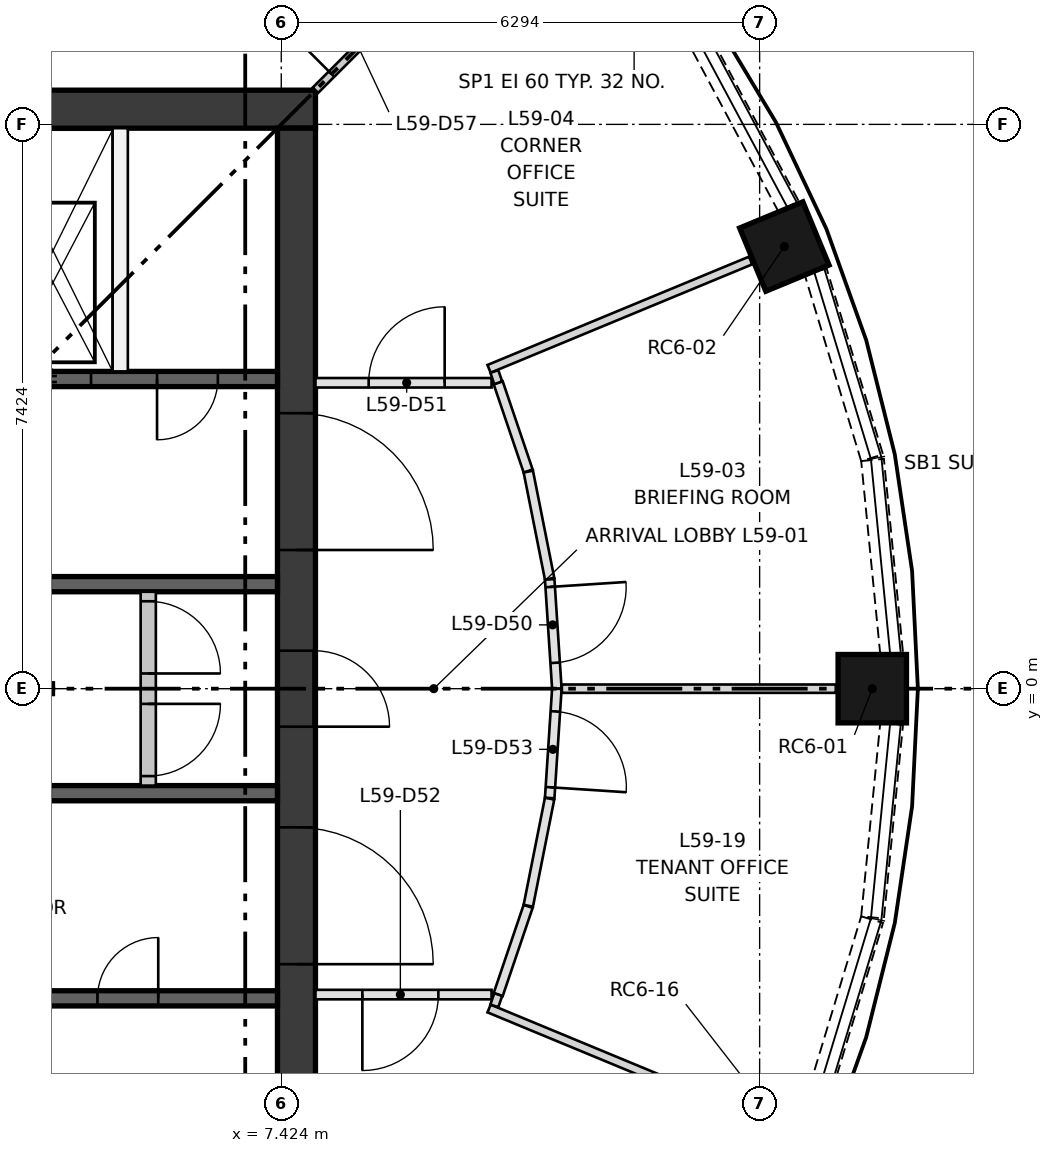
"""IFC4 building model, lengths in metres.
Left out: names, types, materials, properties, quantities, classifications, styles, units other than length and angle.
Written with IfcOpenShell. Run it as: python <this file> out.ifc"""

import sys

from ifc_helpers import new_model, si_unit, direction, frame, frame_2d, origin, origin_2d, place, context, subcontext, project, spatial, rectangle, extrude, element, fill, save


model = new_model("IFC4")
c1 = context("Model", 3, precision=1e-05, world=origin(), true_north=direction((0.0, 1.0)))
c2 = subcontext(c1, "Body", "Model", "MODEL_VIEW")
j1 = project(units=[si_unit("LENGTHUNIT", "METRE"), si_unit("PLANEANGLEUNIT", "RADIAN")], contexts=[c1])
p1 = place(None, origin())
s1 = spatial("IfcSite", under=j1, at=p1, CompositionType="ELEMENT")
p2 = place(p1, origin())
s2 = spatial("IfcBuilding", under=s1, at=p2, CompositionType="ELEMENT")
p3 = place(p2, frame((0.0, 0.0, 217.8)))
s3 = spatial("IfcBuildingStorey", under=s2, at=p3, CompositionType="ELEMENT", Elevation=217.8)
for number, where, z_axis, x_axis in (
    (1, (15.2, 0.0, 0.5), (0.0, 0.0, 1.0), (1.0, 0.0, 0.0)),
    (2, (14.043, 5.817, 0.5), (0.0, 0.0, 1.0), (0.924, 0.383, 0.0)),
):
    element("IfcColumn", number, at=place(p3, frame(where, z_axis=z_axis, x_axis=x_axis)), inside=s3, PredefinedType="COLUMN", context=c2, shape_type="SweptSolid", body=[
        extrude(rectangle(XDim=0.9, YDim=0.9, at=origin_2d()), origin(), (0.0, 0.0, 1.0), 2.85),
    ])
p4 = place(p3, frame((-7.874, 7.624, 0.0), z_axis=(0.0, 0.0, 1.0), x_axis=(1.0, 0.0, 0.0)))
e3 = element("IfcWall", 3, at=p4, inside=s3, PredefinedType="SHEAR", context=c2, shape_type="SweptSolid", body=[
    extrude(rectangle(XDim=15.748, YDim=0.5, at=frame_2d((7.874, 0.0))), origin(), (0.0, 0.0, 1.0), 3.35),
])
p5 = place(p3, frame((7.624, -7.374, 0.0), z_axis=(0.0, 0.0, 1.0), x_axis=(0.0, 1.0, 0.0)))
e4 = element("IfcWall", 4, at=p5, inside=s3, PredefinedType="SHEAR", context=c2, shape_type="SweptSolid", body=[
    extrude(rectangle(XDim=14.748, YDim=0.5, at=frame_2d((7.374, 0.0))), origin(), (0.0, 0.0, 1.0), 3.35),
])
p6 = place(p5, frame((6.874, 0.0, 0.0)))
e5 = element("IfcOpeningElement", 5, at=p6, cuts=e4, PredefinedType="OPENING", context=c2, shape_type="SweptSolid", body=[
    extrude(rectangle(XDim=1.0, YDim=2.1, at=frame_2d((0.5, 1.05))), frame((0.0, 0.26, 0.0), z_axis=(0.0, -1.0, 0.0), x_axis=(1.0, 0.0, 0.0)), (0.0, 0.0, 1.0), 0.52),
])
p7 = place(p5, frame((3.75, 0.0, 0.0)))
e6 = element("IfcOpeningElement", 6, at=p7, cuts=e4, PredefinedType="OPENING", context=c2, shape_type="SweptSolid", body=[
    extrude(rectangle(XDim=1.8, YDim=2.1, at=frame_2d((0.9, 1.05))), frame((0.0, 0.26, 0.0), z_axis=(0.0, -1.0, 0.0), x_axis=(1.0, 0.0, 0.0)), (0.0, 0.0, 1.0), 0.52),
])
p8 = place(p5, frame((9.198, 0.0, 0.0)))
e7 = element("IfcOpeningElement", 7, at=p8, cuts=e4, PredefinedType="OPENING", context=c2, shape_type="SweptSolid", body=[
    extrude(rectangle(XDim=1.8, YDim=2.1, at=frame_2d((0.9, 1.05))), frame((0.0, 0.26, 0.0), z_axis=(0.0, -1.0, 0.0), x_axis=(1.0, 0.0, 0.0)), (0.0, 0.0, 1.0), 0.52),
])
p9 = place(p3, frame((-7.374, -4.074, 0.0), z_axis=(0.0, 0.0, 1.0), x_axis=(1.0, 0.0, 0.0)))
e8 = element("IfcWall", 8, at=p9, inside=s3, PredefinedType="SHEAR", context=c2, shape_type="SweptSolid", body=[
    extrude(rectangle(XDim=14.748, YDim=0.2, at=frame_2d((7.374, 0.0))), origin(), (0.0, 0.0, 1.0), 3.0),
])
p10 = place(p9, frame((1.319, 0.0, 0.0)))
e9 = element("IfcOpeningElement", 9, at=p10, cuts=e8, PredefinedType="OPENING", context=c2, shape_type="SweptSolid", body=[
    extrude(rectangle(XDim=1.1, YDim=2.1, at=frame_2d((0.55, 1.05))), frame((0.0, 0.11, 0.0), z_axis=(0.0, -1.0, 0.0), x_axis=(1.0, 0.0, 0.0)), (0.0, 0.0, 1.0), 0.22),
])
p11 = place(p9, frame((4.456, 0.0, 0.0)))
e10 = element("IfcOpeningElement", 10, at=p11, cuts=e8, PredefinedType="OPENING", context=c2, shape_type="SweptSolid", body=[
    extrude(rectangle(XDim=1.1, YDim=2.1, at=frame_2d((0.55, 1.05))), frame((0.0, 0.11, 0.0), z_axis=(0.0, -1.0, 0.0), x_axis=(1.0, 0.0, 0.0)), (0.0, 0.0, 1.0), 0.22),
])
p12 = place(p9, frame((8.143, 0.0, 0.0)))
e11 = element("IfcOpeningElement", 11, at=p12, cuts=e8, PredefinedType="OPENING", context=c2, shape_type="SweptSolid", body=[
    extrude(rectangle(XDim=1.0, YDim=2.1, at=frame_2d((0.5, 1.05))), frame((0.0, 0.11, 0.0), z_axis=(0.0, -1.0, 0.0), x_axis=(1.0, 0.0, 0.0)), (0.0, 0.0, 1.0), 0.22),
])
p13 = place(p9, frame((12.379, 0.0, 0.0)))
e12 = element("IfcOpeningElement", 12, at=p13, cuts=e8, PredefinedType="OPENING", context=c2, shape_type="SweptSolid", body=[
    extrude(rectangle(XDim=0.8, YDim=2.1, at=frame_2d((0.4, 1.05))), frame((0.0, 0.11, 0.0), z_axis=(0.0, -1.0, 0.0), x_axis=(1.0, 0.0, 0.0)), (0.0, 0.0, 1.0), 0.22),
])
p14 = place(p3, frame((0.0, 4.074, 0.0), z_axis=(0.0, 0.0, 1.0), x_axis=(1.0, 0.0, 0.0)))
e13 = element("IfcWall", 13, at=p14, inside=s3, PredefinedType="SHEAR", context=c2, shape_type="SweptSolid", body=[
    extrude(rectangle(XDim=7.374, YDim=0.2, at=frame_2d((3.687, 0.0))), origin(), (0.0, 0.0, 1.0), 3.0),
])
p15 = place(p14, frame((0.384, 0.0, 0.0)))
e14 = element("IfcOpeningElement", 14, at=p15, cuts=e13, PredefinedType="OPENING", context=c2, shape_type="SweptSolid", body=[
    extrude(rectangle(XDim=1.0, YDim=2.1, at=frame_2d((0.5, 1.05))), frame((0.0, 0.11, 0.0), z_axis=(0.0, -1.0, 0.0), x_axis=(1.0, 0.0, 0.0)), (0.0, 0.0, 1.0), 0.22),
])
p16 = place(p14, frame((2.153, 0.0, 0.0)))
e15 = element("IfcOpeningElement", 15, at=p16, cuts=e13, PredefinedType="OPENING", context=c2, shape_type="SweptSolid", body=[
    extrude(rectangle(XDim=1.0, YDim=2.1, at=frame_2d((0.5, 1.05))), frame((0.0, 0.11, 0.0), z_axis=(0.0, -1.0, 0.0), x_axis=(1.0, 0.0, 0.0)), (0.0, 0.0, 1.0), 0.22),
])
p17 = place(p14, frame((3.921, 0.0, 0.0)))
e16 = element("IfcOpeningElement", 16, at=p17, cuts=e13, PredefinedType="OPENING", context=c2, shape_type="SweptSolid", body=[
    extrude(rectangle(XDim=1.0, YDim=2.1, at=frame_2d((0.5, 1.05))), frame((0.0, 0.11, 0.0), z_axis=(0.0, -1.0, 0.0), x_axis=(1.0, 0.0, 0.0)), (0.0, 0.0, 1.0), 0.22),
])
p18 = place(p14, frame((5.79, 0.0, 0.0)))
e17 = element("IfcOpeningElement", 17, at=p18, cuts=e13, PredefinedType="OPENING", context=c2, shape_type="SweptSolid", body=[
    extrude(rectangle(XDim=0.8, YDim=2.1, at=frame_2d((0.4, 1.05))), frame((0.0, 0.11, 0.0), z_axis=(0.0, -1.0, 0.0), x_axis=(1.0, 0.0, 0.0)), (0.0, 0.0, 1.0), 0.22),
])
for number, where, z_axis, x_axis in (
    (18, (4.374, -1.375, 0.0), (0.0, 0.0, 1.0), (1.0, 0.0, 0.0)),
    (19, (4.374, 1.375, 0.0), (0.0, 0.0, 1.0), (1.0, 0.0, 0.0)),
):
    element("IfcWall", number, at=place(p3, frame(where, z_axis=z_axis, x_axis=x_axis)), inside=s3, PredefinedType="SHEAR", context=c2, shape_type="SweptSolid", body=[
        extrude(rectangle(XDim=3.0, YDim=0.2, at=frame_2d((1.5, 0.0))), origin(), (0.0, 0.0, 1.0), 3.0),
    ])
p19 = place(p3, frame((5.305, 4.174, 0.0), z_axis=(0.0, 0.0, 1.0), x_axis=(0.0, 1.0, 0.0)))
e20 = element("IfcWall", 20, at=p19, inside=s3, PredefinedType="PARTITIONING", context=c2, shape_type="SweptSolid", body=[
    extrude(rectangle(XDim=3.2, YDim=0.2, at=frame_2d((1.6, 0.0))), origin(), (0.0, 0.0, 1.0), 3.0),
])
p20 = place(p3, frame((5.674, -1.275, 0.0), z_axis=(0.0, 0.0, 1.0), x_axis=(0.0, 1.0, 0.0)))
e21 = element("IfcWall", 21, at=p20, inside=s3, PredefinedType="PARTITIONING", context=c2, shape_type="SweptSolid", body=[
    extrude(rectangle(XDim=2.55, YDim=0.2, at=frame_2d((1.275, 0.0))), origin(), (0.0, 0.0, 1.0), 3.0),
])
p21 = place(p20, frame((0.125, 0.0, 0.0)))
e22 = element("IfcOpeningElement", 22, at=p21, cuts=e21, PredefinedType="OPENING", context=c2, shape_type="SweptSolid", body=[
    extrude(rectangle(XDim=0.95, YDim=2.1, at=frame_2d((0.475, 1.05))), frame((0.0, 0.11, 0.0), z_axis=(0.0, -1.0, 0.0), x_axis=(1.0, 0.0, 0.0)), (0.0, 0.0, 1.0), 0.22),
])
p22 = place(p20, frame((1.475, 0.0, 0.0)))
e23 = element("IfcOpeningElement", 23, at=p22, cuts=e21, PredefinedType="OPENING", context=c2, shape_type="SweptSolid", body=[
    extrude(rectangle(XDim=0.95, YDim=2.1, at=frame_2d((0.475, 1.05))), frame((0.0, 0.11, 0.0), z_axis=(0.0, -1.0, 0.0), x_axis=(1.0, 0.0, 0.0)), (0.0, 0.0, 1.0), 0.22),
])
p23 = place(p3, frame((15.455, 0.464, 0.0), z_axis=(0.0, 0.0, 1.0), x_axis=(-0.09813315545, 0.995173293352, 0.0)))
e24 = element("IfcWall", 24, at=p23, inside=s3, PredefinedType="SOLIDWALL", context=c2, shape_type="SweptSolid", body=[
    extrude(rectangle(XDim=2.558, YDim=0.3, at=frame_2d((1.279, 0.0))), origin(), (0.0, 0.0, 1.0), 0.9),
])
p24 = place(p3, frame((15.198, 3.038, 0.0), z_axis=(0.0, 0.0, 1.0), x_axis=(-0.290219358397, 0.956960147557, 0.0)))
e25 = element("IfcWall", 25, at=p24, inside=s3, PredefinedType="SOLIDWALL", context=c2, shape_type="SweptSolid", body=[
    extrude(rectangle(XDim=2.557, YDim=0.3, at=frame_2d((1.279, 0.0))), origin(), (0.0, 0.0, 1.0), 0.9),
])
p25 = place(p3, frame((14.1, 6.343, 0.0), z_axis=(0.0, 0.0, 1.0), x_axis=(-0.471603904468, 0.881810499649, 0.0)))
e26 = element("IfcWall", 26, at=p25, inside=s3, PredefinedType="SOLIDWALL", context=c2, shape_type="SweptSolid", body=[
    extrude(rectangle(XDim=2.557, YDim=0.3, at=frame_2d((1.278, 0.0))), origin(), (0.0, 0.0, 1.0), 0.9),
])
p26 = place(p3, frame((14.455, -5.486, 0.0), z_axis=(0.0, 0.0, 1.0), x_axis=(0.290219358397, 0.956960147557, 0.0)))
e27 = element("IfcWall", 27, at=p26, inside=s3, PredefinedType="SOLIDWALL", context=c2, shape_type="SweptSolid", body=[
    extrude(rectangle(XDim=2.557, YDim=0.3, at=frame_2d((1.279, 0.0))), origin(), (0.0, 0.0, 1.0), 0.9),
])
p27 = place(p3, frame((15.204, -3.009, 0.0), z_axis=(0.0, 0.0, 1.0), x_axis=(0.09813315545, 0.995173293352, 0.0)))
e28 = element("IfcWall", 28, at=p27, inside=s3, PredefinedType="SOLIDWALL", context=c2, shape_type="SweptSolid", body=[
    extrude(rectangle(XDim=2.558, YDim=0.3, at=frame_2d((1.279, 0.0))), origin(), (0.0, 0.0, 1.0), 0.9),
])
p28 = place(p3, frame((10.278, 4.024, 0.0), z_axis=(0.0, 0.0, 1.0), x_axis=(0.321363343769, -0.946955965862, 0.0)))
e29 = element("IfcWall", 29, at=p28, inside=s3, PredefinedType="PARTITIONING", context=c2, shape_type="SweptSolid", body=[
    extrude(rectangle(XDim=1.225, YDim=0.125, at=frame_2d((0.613, 0.0))), origin(), (0.0, 0.0, 1.0), 3.0),
])
p29 = place(p3, frame((10.674, 2.856, 0.0), z_axis=(0.0, 0.0, 1.0), x_axis=(0.195005351681, -0.980802178228, 0.0)))
e30 = element("IfcWall", 30, at=p29, inside=s3, PredefinedType="PARTITIONING", context=c2, shape_type="SweptSolid", body=[
    extrude(rectangle(XDim=1.437, YDim=0.125, at=frame_2d((0.719, 0.0))), origin(), (0.0, 0.0, 1.0), 3.0),
])
p30 = place(p3, frame((10.956, 1.438, 0.0), z_axis=(0.0, 0.0, 1.0), x_axis=(0.065383473363, -0.997860211358, 0.0)))
e31 = element("IfcWall", 31, at=p30, inside=s3, PredefinedType="PARTITIONING", context=c2, shape_type="SweptSolid", body=[
    extrude(rectangle(XDim=1.441, YDim=0.125, at=frame_2d((0.721, 0.0))), origin(), (0.0, 0.0, 1.0), 3.0),
])
p31 = place(p30, frame((0.1, 0.0, 0.0)))
e32 = element("IfcOpeningElement", 32, at=p31, cuts=e31, PredefinedType="OPENING", context=c2, shape_type="SweptSolid", body=[
    extrude(rectangle(XDim=1.0, YDim=2.1, at=frame_2d((0.5, 1.05))), frame((0.0, 0.073, 0.0), z_axis=(0.0, -1.0, 0.0), x_axis=(1.0, 0.0, 0.0)), (0.0, 0.0, 1.0), 0.145),
])
p32 = place(p3, frame((7.874, 4.024, 0.0), z_axis=(0.0, 0.0, 1.0), x_axis=(1.0, 0.0, 0.0)))
e33 = element("IfcWall", 33, at=p32, inside=s3, PredefinedType="PARTITIONING", context=c2, shape_type="SweptSolid", body=[
    extrude(rectangle(XDim=2.317, YDim=0.125, at=frame_2d((1.158, 0.0))), origin(), (0.0, 0.0, 1.0), 3.0),
])
p33 = place(p32, frame((0.7, 0.0, 0.0)))
e34 = element("IfcOpeningElement", 34, at=p33, cuts=e33, PredefinedType="OPENING", context=c2, shape_type="SweptSolid", body=[
    extrude(rectangle(XDim=1.0, YDim=2.1, at=frame_2d((0.5, 1.05))), frame((0.0, 0.073, 0.0), z_axis=(0.0, -1.0, 0.0), x_axis=(1.0, 0.0, 0.0)), (0.0, 0.0, 1.0), 0.145),
])
p34 = place(p3, frame((10.191, -4.024, 0.0), z_axis=(0.0, 0.0, 1.0), x_axis=(-1.0, 0.0, 0.0)))
e35 = element("IfcWall", 35, at=p34, inside=s3, PredefinedType="PARTITIONING", context=c2, shape_type="SweptSolid", body=[
    extrude(rectangle(XDim=2.317, YDim=0.125, at=frame_2d((1.158, 0.0))), origin(), (0.0, 0.0, 1.0), 3.0),
])
p35 = place(p34, frame((0.7, 0.0, 0.0)))
e36 = element("IfcOpeningElement", 36, at=p35, cuts=e35, PredefinedType="OPENING", context=c2, shape_type="SweptSolid", body=[
    extrude(rectangle(XDim=1.0, YDim=2.1, at=frame_2d((0.5, 1.05))), frame((0.0, 0.073, 0.0), z_axis=(0.0, -1.0, 0.0), x_axis=(1.0, 0.0, 0.0)), (0.0, 0.0, 1.0), 0.145),
])
p36 = place(p3, frame((10.672, -2.864, 0.0), z_axis=(0.0, 0.0, 1.0), x_axis=(-0.321363343769, -0.946955965862, 0.0)))
e37 = element("IfcWall", 37, at=p36, inside=s3, PredefinedType="PARTITIONING", context=c2, shape_type="SweptSolid", body=[
    extrude(rectangle(XDim=1.225, YDim=0.125, at=frame_2d((0.613, 0.0))), origin(), (0.0, 0.0, 1.0), 3.0),
])
p37 = place(p3, frame((10.955, -1.446, 0.0), z_axis=(0.0, 0.0, 1.0), x_axis=(-0.195005351681, -0.980802178228, 0.0)))
e38 = element("IfcWall", 38, at=p37, inside=s3, PredefinedType="PARTITIONING", context=c2, shape_type="SweptSolid", body=[
    extrude(rectangle(XDim=1.437, YDim=0.125, at=frame_2d((0.719, 0.0))), origin(), (0.0, 0.0, 1.0), 3.0),
])
p38 = place(p3, frame((11.05, 0.0, 0.0), z_axis=(0.0, 0.0, 1.0), x_axis=(-0.065383473363, -0.997860211358, 0.0)))
e39 = element("IfcWall", 39, at=p38, inside=s3, PredefinedType="PARTITIONING", context=c2, shape_type="SweptSolid", body=[
    extrude(rectangle(XDim=1.441, YDim=0.125, at=frame_2d((0.721, 0.0))), origin(), (0.0, 0.0, 1.0), 3.0),
])
p39 = place(p38, frame((0.3, 0.0, 0.0)))
e40 = element("IfcOpeningElement", 40, at=p39, cuts=e39, PredefinedType="OPENING", context=c2, shape_type="SweptSolid", body=[
    extrude(rectangle(XDim=1.0, YDim=2.1, at=frame_2d((0.5, 1.05))), frame((0.0, 0.073, 0.0), z_axis=(0.0, -1.0, 0.0), x_axis=(1.0, 0.0, 0.0)), (0.0, 0.0, 1.0), 0.145),
])
p40 = place(p3, frame((10.158, 4.208, 0.0), z_axis=(0.0, 0.0, 1.0), x_axis=(0.923897012701, 0.382641228728, 0.0)))
e41 = element("IfcWall", 41, at=p40, inside=s3, PredefinedType="PARTITIONING", context=c2, shape_type="SweptSolid", body=[
    extrude(rectangle(XDim=3.725, YDim=0.11, at=frame_2d((1.862, 0.0))), origin(), (0.0, 0.0, 1.0), 3.0),
])
p41 = place(p3, frame((10.278, 4.024, 0.0), z_axis=(0.0, 0.0, 1.0), x_axis=(-0.321819116975, 0.94680117023, 0.0)))
e42 = element("IfcWall", 42, at=p41, inside=s3, PredefinedType="PARTITIONING", context=c2, shape_type="SweptSolid", body=[
    extrude(rectangle(XDim=0.157, YDim=0.11, at=frame_2d((0.079, 0.0))), origin(), (0.0, 0.0, 1.0), 3.0),
])
p42 = place(p3, frame((14.72, 0.0, 0.0), z_axis=(0.0, 0.0, 1.0), x_axis=(-1.0, 0.0, 0.0)))
e43 = element("IfcWall", 43, at=p42, inside=s3, PredefinedType="PARTITIONING", context=c2, shape_type="SweptSolid", body=[
    extrude(rectangle(XDim=3.604, YDim=0.11, at=frame_2d((1.802, 0.0))), origin(), (0.0, 0.0, 1.0), 3.0),
])
p43 = place(p3, frame((7.874, 7.874, 0.0), z_axis=(0.0, 0.0, 1.0), x_axis=(0.707106781187, 0.707106781187, 0.0)))
e44 = element("IfcWall", 44, at=p43, inside=s3, PredefinedType="PARTITIONING", context=c2, shape_type="SweptSolid", body=[
    extrude(rectangle(XDim=3.584, YDim=0.1, at=frame_2d((1.792, 0.0))), origin(), (0.0, 0.0, 1.0), 3.0),
])
p44 = place(p43, frame((0.3, 0.0, 0.0)))
e45 = element("IfcOpeningElement", 45, at=p44, cuts=e44, PredefinedType="OPENING", context=c2, shape_type="SweptSolid", body=[
    extrude(rectangle(XDim=1.0, YDim=2.1, at=frame_2d((0.5, 1.05))), frame((0.0, 0.06, 0.0), z_axis=(0.0, -1.0, 0.0), x_axis=(1.0, 0.0, 0.0)), (0.0, 0.0, 1.0), 0.12),
])
p45 = place(p3, frame((10.158, -4.208, 0.0), z_axis=(0.0, 0.0, 1.0), x_axis=(0.923897012701, -0.382641228728, 0.0)))
e46 = element("IfcWall", 46, at=p45, inside=s3, PredefinedType="PARTITIONING", context=c2, shape_type="SweptSolid", body=[
    extrude(rectangle(XDim=3.725, YDim=0.11, at=frame_2d((1.862, 0.0))), origin(), (0.0, 0.0, 1.0), 3.0),
])
p46 = place(p3, frame((10.278, -4.024, 0.0), z_axis=(0.0, 0.0, 1.0), x_axis=(-0.321819116975, -0.94680117023, 0.0)))
e47 = element("IfcWall", 47, at=p46, inside=s3, PredefinedType="PARTITIONING", context=c2, shape_type="SweptSolid", body=[
    extrude(rectangle(XDim=0.157, YDim=0.11, at=frame_2d((0.079, 0.0))), origin(), (0.0, 0.0, 1.0), 3.0),
])
p47 = place(p17, frame((1.0, 0.0, 0.0), z_axis=(0.0, 0.0, 1.0), x_axis=(-1.0, 0.0, 0.0)))
e48 = element("IfcDoor", 48, at=p47, inside=s3, OperationType="DOUBLE_DOOR_SLIDING", PredefinedType="DOOR", context=c2, shape_type="SweptSolid", body=[
    extrude(rectangle(XDim=1.0, YDim=2.1, at=frame_2d((0.5, 1.05))), frame((0.0, 0.025, 0.0), z_axis=(0.0, -1.0, 0.0), x_axis=(1.0, 0.0, 0.0)), (0.0, 0.0, 1.0), 0.05),
])
fill(e16, e48)
p48 = place(p21, frame((0.95, 0.0, 0.0), z_axis=(0.0, 0.0, 1.0), x_axis=(-1.0, 0.0, 0.0)))
e49 = element("IfcDoor", 49, at=p48, inside=s3, OperationType="SINGLE_SWING_RIGHT", PredefinedType="DOOR", context=c2, shape_type="SweptSolid", body=[
    extrude(rectangle(XDim=0.95, YDim=2.1, at=frame_2d((0.475, 1.05))), frame((0.0, 0.025, 0.0), z_axis=(0.0, -1.0, 0.0), x_axis=(1.0, 0.0, 0.0)), (0.0, 0.0, 1.0), 0.05),
])
fill(e22, e49)
p49 = place(p22, frame((0.95, 0.0, 0.0), z_axis=(0.0, 0.0, 1.0), x_axis=(-1.0, 0.0, 0.0)))
e50 = element("IfcDoor", 50, at=p49, inside=s3, OperationType="SINGLE_SWING_LEFT", PredefinedType="DOOR", context=c2, shape_type="SweptSolid", body=[
    extrude(rectangle(XDim=0.95, YDim=2.1, at=frame_2d((0.475, 1.05))), frame((0.0, 0.025, 0.0), z_axis=(0.0, -1.0, 0.0), x_axis=(1.0, 0.0, 0.0)), (0.0, 0.0, 1.0), 0.05),
])
fill(e23, e50)
p50 = place(p13, origin())
e51 = element("IfcDoor", 51, at=p50, inside=s3, OperationType="SINGLE_SWING_RIGHT", PredefinedType="DOOR", context=c2, shape_type="SweptSolid", body=[
    extrude(rectangle(XDim=0.8, YDim=2.1, at=frame_2d((0.4, 1.05))), frame((0.0, 0.025, 0.0), z_axis=(0.0, -1.0, 0.0), x_axis=(1.0, 0.0, 0.0)), (0.0, 0.0, 1.0), 0.05),
])
fill(e12, e51)
p51 = place(p18, frame((0.8, 0.0, 0.0), z_axis=(0.0, 0.0, 1.0), x_axis=(-1.0, 0.0, 0.0)))
e52 = element("IfcDoor", 52, at=p51, inside=s3, OperationType="SINGLE_SWING_LEFT", PredefinedType="DOOR", context=c2, shape_type="SweptSolid", body=[
    extrude(rectangle(XDim=0.8, YDim=2.1, at=frame_2d((0.4, 1.05))), frame((0.0, 0.025, 0.0), z_axis=(0.0, -1.0, 0.0), x_axis=(1.0, 0.0, 0.0)), (0.0, 0.0, 1.0), 0.05),
])
fill(e17, e52)
p52 = place(p6, frame((1.0, 0.0, 0.0), z_axis=(0.0, 0.0, 1.0), x_axis=(-1.0, 0.0, 0.0)))
e53 = element("IfcDoor", 53, at=p52, inside=s3, OperationType="SINGLE_SWING_LEFT", PredefinedType="DOOR", context=c2, shape_type="SweptSolid", body=[
    extrude(rectangle(XDim=1.0, YDim=2.1, at=frame_2d((0.5, 1.05))), frame((0.0, 0.25, 0.0), z_axis=(0.0, -1.0, 0.0), x_axis=(1.0, 0.0, 0.0)), (0.0, 0.0, 1.0), 0.05),
])
fill(e5, e53)
p53 = place(p7, frame((1.8, 0.0, 0.0), z_axis=(0.0, 0.0, 1.0), x_axis=(-1.0, 0.0, 0.0)))
e54 = element("IfcDoor", 54, at=p53, inside=s3, OperationType="DOUBLE_DOOR_SINGLE_SWING", PredefinedType="DOOR", context=c2, shape_type="SweptSolid", body=[
    extrude(rectangle(XDim=1.8, YDim=2.1, at=frame_2d((0.9, 1.05))), frame((0.0, 0.025, 0.0), z_axis=(0.0, -1.0, 0.0), x_axis=(1.0, 0.0, 0.0)), (0.0, 0.0, 1.0), 0.05),
])
fill(e6, e54)
p54 = place(p8, frame((1.8, 0.0, 0.0), z_axis=(0.0, 0.0, 1.0), x_axis=(-1.0, 0.0, 0.0)))
e55 = element("IfcDoor", 55, at=p54, inside=s3, OperationType="DOUBLE_DOOR_SINGLE_SWING", PredefinedType="DOOR", context=c2, shape_type="SweptSolid", body=[
    extrude(rectangle(XDim=1.8, YDim=2.1, at=frame_2d((0.9, 1.05))), frame((0.0, 0.025, 0.0), z_axis=(0.0, -1.0, 0.0), x_axis=(1.0, 0.0, 0.0)), (0.0, 0.0, 1.0), 0.05),
])
fill(e7, e55)
p55 = place(p31, origin())
e56 = element("IfcDoor", 56, at=p55, inside=s3, OperationType="SINGLE_SWING_LEFT", PredefinedType="DOOR", context=c2, shape_type="SweptSolid", body=[
    extrude(rectangle(XDim=1.0, YDim=2.1, at=frame_2d((0.5, 1.05))), frame((0.0, 0.025, 0.0), z_axis=(0.0, -1.0, 0.0), x_axis=(1.0, 0.0, 0.0)), (0.0, 0.0, 1.0), 0.05),
])
fill(e32, e56)
p56 = place(p33, origin())
e57 = element("IfcDoor", 57, at=p56, inside=s3, OperationType="SINGLE_SWING_RIGHT", PredefinedType="DOOR", context=c2, shape_type="SweptSolid", body=[
    extrude(rectangle(XDim=1.0, YDim=2.1, at=frame_2d((0.5, 1.05))), frame((0.0, 0.025, 0.0), z_axis=(0.0, -1.0, 0.0), x_axis=(1.0, 0.0, 0.0)), (0.0, 0.0, 1.0), 0.05),
])
fill(e34, e57)
p57 = place(p35, origin())
e58 = element("IfcDoor", 58, at=p57, inside=s3, OperationType="SINGLE_SWING_RIGHT", PredefinedType="DOOR", context=c2, shape_type="SweptSolid", body=[
    extrude(rectangle(XDim=1.0, YDim=2.1, at=frame_2d((0.5, 1.05))), frame((0.0, 0.025, 0.0), z_axis=(0.0, -1.0, 0.0), x_axis=(1.0, 0.0, 0.0)), (0.0, 0.0, 1.0), 0.05),
])
fill(e36, e58)
p58 = place(p39, origin())
e59 = element("IfcDoor", 59, at=p58, inside=s3, OperationType="SINGLE_SWING_RIGHT", PredefinedType="DOOR", context=c2, shape_type="SweptSolid", body=[
    extrude(rectangle(XDim=1.0, YDim=2.1, at=frame_2d((0.5, 1.05))), frame((0.0, 0.025, 0.0), z_axis=(0.0, -1.0, 0.0), x_axis=(1.0, 0.0, 0.0)), (0.0, 0.0, 1.0), 0.05),
])
fill(e40, e59)
p59 = place(p44, origin())
e60 = element("IfcDoor", 60, at=p59, inside=s3, OperationType="SINGLE_SWING_LEFT", PredefinedType="DOOR", context=c2, shape_type="SweptSolid", body=[
    extrude(rectangle(XDim=1.0, YDim=2.1, at=frame_2d((0.5, 1.05))), frame((0.0, 0.025, 0.0), z_axis=(0.0, -1.0, 0.0), x_axis=(1.0, 0.0, 0.0)), (0.0, 0.0, 1.0), 0.05),
])
fill(e45, e60)
save(model, sys.argv[1])
